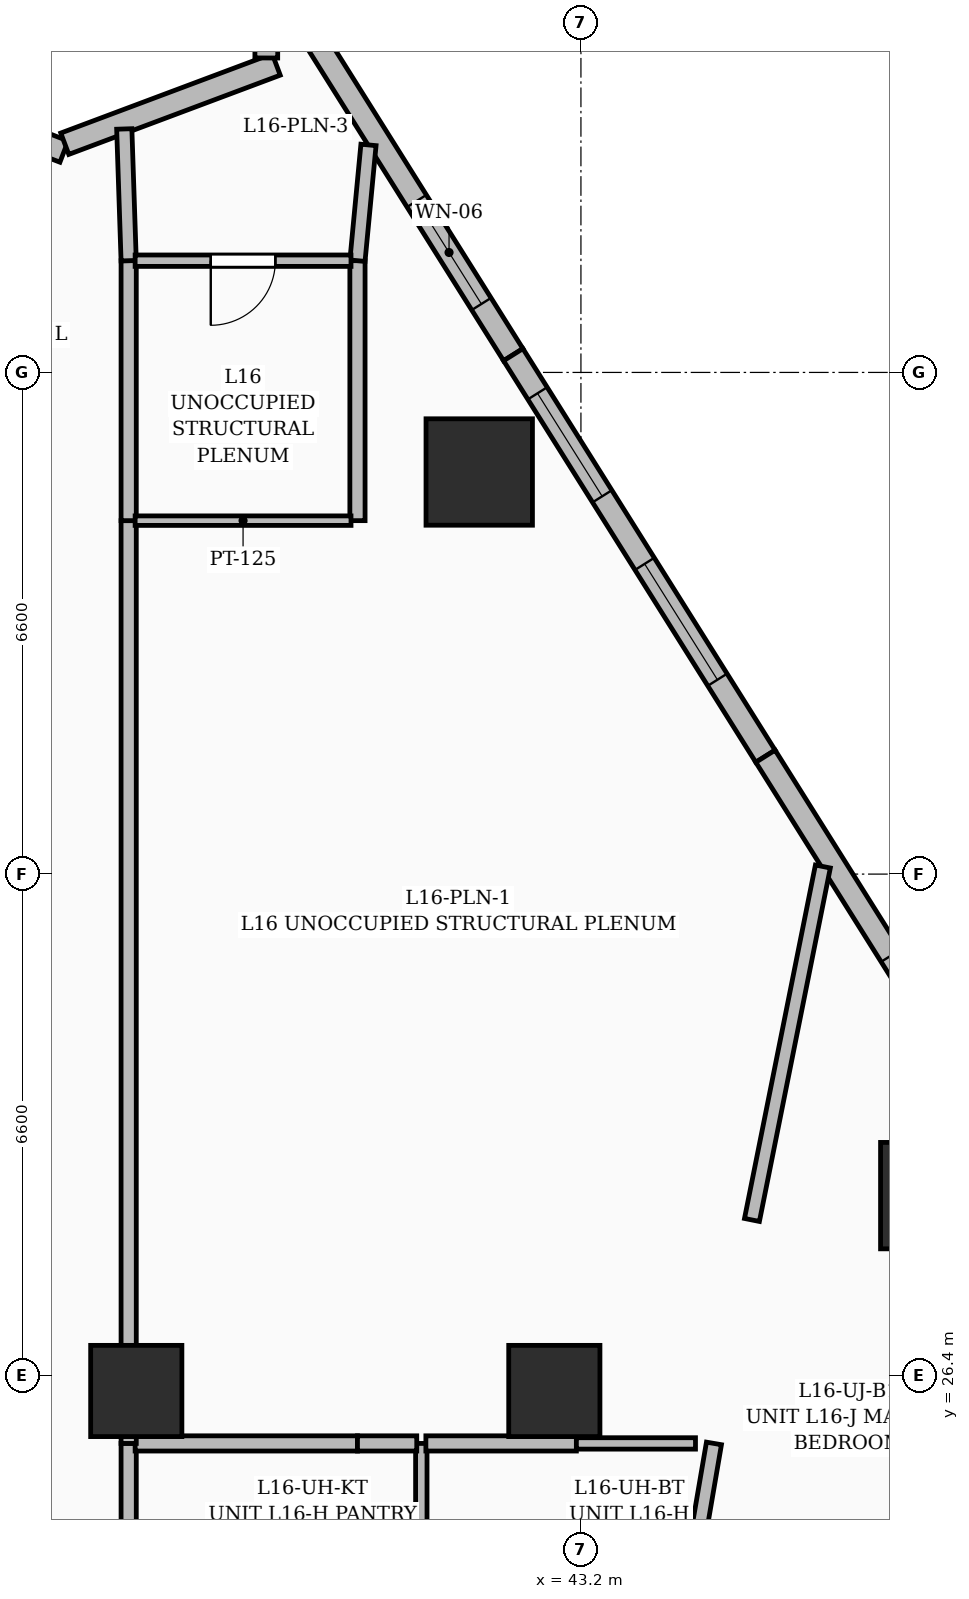
"""IFC4 building model, lengths in metres.
Left out: names, types, materials, properties, quantities, classifications, styles, units other than length and angle.
Written with IfcOpenShell. Run it as: python <this file> out.ifc"""

import sys

from ifc_helpers import new_model, si_unit, direction, frame, frame_2d, origin, origin_2d, place, context, subcontext, project, spatial, rectangle, extrude, element, fill, save


model = new_model("IFC4")
c1 = context("Model", 3, precision=1e-05, world=origin(), true_north=direction((0.0, 1.0)))
c2 = subcontext(c1, "Body", "Model", "MODEL_VIEW")
j1 = project(units=[si_unit("LENGTHUNIT", "METRE"), si_unit("PLANEANGLEUNIT", "RADIAN")], contexts=[c1])
p1 = place(None, origin())
s1 = spatial("IfcSite", under=j1, at=p1, CompositionType="ELEMENT")
p2 = place(p1, origin())
s2 = spatial("IfcBuilding", under=s1, at=p2, CompositionType="ELEMENT")
p3 = place(p2, frame((0.0, 0.0, 67.8)))
s3 = spatial("IfcBuildingStorey", under=s2, at=p3, CompositionType="ELEMENT", Elevation=67.8)
for number, where, z_axis, x_axis in (
    (1, (42.85, 26.2, 0.0), (0.0, 0.0, 1.0), (1.0, 0.0, 0.0)),
    (2, (37.35, 26.2, 0.0), (0.0, 0.0, 1.0), (1.0, 0.0, 0.0)),
):
    element("IfcColumn", number, at=place(p3, frame(where, z_axis=z_axis, x_axis=x_axis)), inside=s3, PredefinedType="COLUMN", context=c2, shape_type="SweptSolid", body=[
        extrude(rectangle(XDim=1.2, YDim=1.2, at=origin_2d()), origin(), (0.0, 0.0, 1.0), 3.6),
    ])
for number, where, z_axis, x_axis in (
    (3, (47.842, 28.77, 0.0), (0.0, 0.0, 1.0), (1.0, 0.0, 0.0)),
    (4, (41.862, 38.29, 0.0), (0.0, 0.0, 1.0), (1.0, 0.0, 0.0)),
):
    element("IfcColumn", number, at=place(p3, frame(where, z_axis=z_axis, x_axis=x_axis)), inside=s3, PredefinedType="COLUMN", context=c2, shape_type="SweptSolid", body=[
        extrude(rectangle(XDim=1.4, YDim=1.4, at=origin_2d()), origin(), (0.0, 0.0, 1.0), 3.6),
    ])
p4 = place(p3, frame((33.614, 43.579, 0.0), z_axis=(0.0, 0.0, 1.0), x_axis=(0.933166321884, -0.359444871576, 0.0)))
e5 = element("IfcWall", 5, at=p4, inside=s3, PredefinedType="SOLIDWALL", context=c2, shape_type="SweptSolid", body=[
    extrude(rectangle(XDim=2.985, YDim=0.3, at=frame_2d((1.493, 0.0))), origin(), (0.0, 0.0, 1.0), 3.35),
])
p5 = place(p4, frame((0.5, 0.0, 0.6)))
e6 = element("IfcOpeningElement", 6, at=p5, cuts=e5, PredefinedType="OPENING", context=c2, shape_type="SweptSolid", body=[
    extrude(rectangle(XDim=1.5, YDim=2.1, at=frame_2d((0.75, 1.05))), frame((0.0, 0.16, 0.0), z_axis=(0.0, -1.0, 0.0), x_axis=(1.0, 0.0, 0.0)), (0.0, 0.0, 1.0), 0.32),
])
p6 = place(p3, frame((36.409, 42.609, 0.0), z_axis=(0.0, 0.0, 1.0), x_axis=(0.936403459864, 0.350925291699, 0.0)))
e7 = element("IfcWall", 7, at=p6, inside=s3, PredefinedType="SOLIDWALL", context=c2, shape_type="SweptSolid", body=[
    extrude(rectangle(XDim=2.971, YDim=0.3, at=frame_2d((1.485, 0.0))), origin(), (0.0, 0.0, 1.0), 3.35),
])
p7 = place(p3, frame((39.061, 43.737, 0.0), z_axis=(0.0, 0.0, 1.0), x_axis=(0.004359916705, 0.999990495518, 0.0)))
e8 = element("IfcWall", 8, at=p7, inside=s3, PredefinedType="SOLIDWALL", context=c2, shape_type="SweptSolid", body=[
    extrude(rectangle(XDim=1.4, YDim=0.3, at=frame_2d((0.7, 0.0))), origin(), (0.0, 0.0, 1.0), 3.35),
])
p8 = place(p3, frame((39.284, 44.65, 0.0), z_axis=(0.0, 0.0, 1.0), x_axis=(0.531922759959, -0.846792877531, 0.0)))
e9 = element("IfcWall", 9, at=p8, inside=s3, PredefinedType="SOLIDWALL", context=c2, shape_type="SweptSolid", body=[
    extrude(rectangle(XDim=5.688, YDim=0.3, at=frame_2d((2.844, 0.0))), origin(), (0.0, 0.0, 1.0), 3.35),
])
p9 = place(p8, frame((3.3, 0.0, 0.55)))
e10 = element("IfcOpeningElement", 10, at=p9, cuts=e9, PredefinedType="OPENING", context=c2, shape_type="SweptSolid", body=[
    extrude(rectangle(XDim=1.6, YDim=2.2, at=frame_2d((0.8, 1.1))), frame((0.0, 0.16, 0.0), z_axis=(0.0, -1.0, 0.0), x_axis=(1.0, 0.0, 0.0)), (0.0, 0.0, 1.0), 0.32),
])
p10 = place(p3, frame((42.31, 39.833, 0.0), z_axis=(0.0, 0.0, 1.0), x_axis=(0.531897384848, -0.846808816671, 0.0)))
e11 = element("IfcWall", 11, at=p10, inside=s3, PredefinedType="SOLIDWALL", context=c2, shape_type="SweptSolid", body=[
    extrude(rectangle(XDim=6.238, YDim=0.3, at=frame_2d((3.119, 0.0))), origin(), (0.0, 0.0, 1.0), 3.35),
])
p11 = place(p10, frame((0.6, 0.0, 0.55)))
e12 = element("IfcOpeningElement", 12, at=p11, cuts=e11, PredefinedType="OPENING", context=c2, shape_type="SweptSolid", body=[
    extrude(rectangle(XDim=1.6, YDim=2.2, at=frame_2d((0.8, 1.1))), frame((0.0, 0.16, 0.0), z_axis=(0.0, -1.0, 0.0), x_axis=(1.0, 0.0, 0.0)), (0.0, 0.0, 1.0), 0.32),
])
p12 = place(p10, frame((3.25, 0.0, 0.6)))
e13 = element("IfcOpeningElement", 13, at=p12, cuts=e11, PredefinedType="OPENING", context=c2, shape_type="SweptSolid", body=[
    extrude(rectangle(XDim=1.8, YDim=2.1, at=frame_2d((0.9, 1.05))), frame((0.0, 0.16, 0.0), z_axis=(0.0, -1.0, 0.0), x_axis=(1.0, 0.0, 0.0)), (0.0, 0.0, 1.0), 0.32),
])
p13 = place(p3, frame((45.627, 34.551, 0.0), z_axis=(0.0, 0.0, 1.0), x_axis=(0.531925449882, -0.846791187819, 0.0)))
e14 = element("IfcWall", 14, at=p13, inside=s3, PredefinedType="SOLIDWALL", context=c2, shape_type="SweptSolid", body=[
    extrude(rectangle(XDim=6.238, YDim=0.3, at=frame_2d((3.119, 0.0))), origin(), (0.0, 0.0, 1.0), 3.35),
])
p14 = place(p13, frame((3.1, 0.0, 0.55)))
e15 = element("IfcOpeningElement", 15, at=p14, cuts=e14, PredefinedType="OPENING", context=c2, shape_type="SweptSolid", body=[
    extrude(rectangle(XDim=1.6, YDim=2.2, at=frame_2d((0.8, 1.1))), frame((0.0, 0.16, 0.0), z_axis=(0.0, -1.0, 0.0), x_axis=(1.0, 0.0, 0.0)), (0.0, 0.0, 1.0), 0.32),
])
p15 = place(p3, frame((41.1, 22.768, 0.0), z_axis=(0.0, 0.0, 1.0), x_axis=(0.0, 1.0, 0.0)))
e16 = element("IfcWall", 16, at=p15, inside=s3, PredefinedType="PARTITIONING", context=c2, shape_type="SweptSolid", body=[
    extrude(rectangle(XDim=2.742, YDim=0.15, at=frame_2d((1.371, 0.0))), origin(), (0.0, 0.0, 1.0), 3.35),
])
p16 = place(p3, frame((37.25, 25.51, 0.0), z_axis=(0.0, 0.0, 1.0), x_axis=(0.0, -1.0, 0.0)))
e17 = element("IfcWall", 17, at=p16, inside=s3, PredefinedType="PARTITIONING", context=c2, shape_type="SweptSolid", body=[
    extrude(rectangle(XDim=2.742, YDim=0.2, at=frame_2d((1.371, 0.0))), origin(), (0.0, 0.0, 1.0), 2.309),
])
p17 = place(p3, frame((40.26, 25.51, 0.0), z_axis=(0.0, 0.0, 1.0), x_axis=(-1.0, 0.0, 0.0)))
e18 = element("IfcWall", 18, at=p17, inside=s3, PredefinedType="PARTITIONING", context=c2, shape_type="SweptSolid", body=[
    extrude(rectangle(XDim=2.925, YDim=0.2, at=frame_2d((1.462, 0.0))), origin(), (0.0, 0.0, 1.0), 3.35),
])
p18 = place(p3, frame((44.52, 23.0, 0.0), z_axis=(0.0, 0.0, 1.0), x_axis=(0.168828104549, 0.985645509864, 0.0)))
e19 = element("IfcWall", 19, at=p18, inside=s3, PredefinedType="PARTITIONING", context=c2, shape_type="SweptSolid", body=[
    extrude(rectangle(XDim=2.547, YDim=0.2, at=frame_2d((1.273, 0.0))), origin(), (0.0, 0.0, 1.0), 3.35),
])
p19 = place(p3, frame((43.14, 25.51, 0.0), z_axis=(0.0, 0.0, 1.0), x_axis=(-1.0, 0.0, 0.0)))
e20 = element("IfcWall", 20, at=p19, inside=s3, PredefinedType="PARTITIONING", context=c2, shape_type="SweptSolid", body=[
    extrude(rectangle(XDim=1.98, YDim=0.2, at=frame_2d((0.99, 0.0))), origin(), (0.0, 0.0, 1.0), 2.309),
])
p20 = place(p3, frame((46.383, 33.1, 0.0), z_axis=(0.0, 0.0, 1.0), x_axis=(-0.196739742163, -0.980455748034, 0.0)))
e21 = element("IfcWall", 21, at=p20, inside=s3, PredefinedType="PARTITIONING", context=c2, shape_type="SweptSolid", body=[
    extrude(rectangle(XDim=4.743, YDim=0.2, at=frame_2d((2.372, 0.0))), origin(), (0.0, 0.0, 1.0), 2.37),
])
p21 = place(p3, frame((37.25, 25.51, 0.0), z_axis=(0.0, 0.0, 1.0), x_axis=(0.0, 1.0, 0.0)))
e22 = element("IfcWall", 22, at=p21, inside=s3, PredefinedType="PARTITIONING", context=c2, shape_type="SweptSolid", body=[
    extrude(rectangle(XDim=12.14, YDim=0.2, at=frame_2d((6.07, 0.0))), origin(), (0.0, 0.0, 1.0), 2.279),
])
p22 = place(p3, frame((37.25, 37.65, 0.0), z_axis=(0.0, 0.0, 1.0), x_axis=(0.0, 1.0, 0.0)))
e23 = element("IfcWall", 23, at=p22, inside=s3, PredefinedType="PARTITIONING", context=c2, shape_type="SweptSolid", body=[
    extrude(rectangle(XDim=3.42, YDim=0.2, at=frame_2d((1.71, 0.0))), origin(), (0.0, 0.0, 1.0), 2.37),
])
p23 = place(p3, frame((37.25, 41.07, 0.0), z_axis=(0.0, 0.0, 1.0), x_axis=(-0.033511738673, 0.999438323946, 0.0)))
e24 = element("IfcWall", 24, at=p23, inside=s3, PredefinedType="PARTITIONING", context=c2, shape_type="SweptSolid", body=[
    extrude(rectangle(XDim=1.734, YDim=0.2, at=frame_2d((0.867, 0.0))), origin(), (0.0, 0.0, 1.0), 3.35),
])
p24 = place(p3, frame((40.26, 41.07, 0.0), z_axis=(0.0, 0.0, 1.0), x_axis=(0.0, -1.0, 0.0)))
e25 = element("IfcWall", 25, at=p24, inside=s3, PredefinedType="PARTITIONING", context=c2, shape_type="SweptSolid", body=[
    extrude(rectangle(XDim=3.42, YDim=0.2, at=frame_2d((1.71, 0.0))), origin(), (0.0, 0.0, 1.0), 2.37),
])
p25 = place(p3, frame((40.405, 42.593, 0.0), z_axis=(0.0, 0.0, 1.0), x_axis=(-0.094794030576, -0.99549690696, 0.0)))
e26 = element("IfcWall", 26, at=p25, inside=s3, PredefinedType="PARTITIONING", context=c2, shape_type="SweptSolid", body=[
    extrude(rectangle(XDim=1.53, YDim=0.2, at=frame_2d((0.765, 0.0))), origin(), (0.0, 0.0, 1.0), 3.35),
])
p26 = place(p3, frame((40.175, 37.65, 0.0), z_axis=(0.0, 0.0, 1.0), x_axis=(-1.0, 0.0, 0.0)))
e27 = element("IfcWall", 27, at=p26, inside=s3, PredefinedType="PARTITIONING", context=c2, shape_type="SweptSolid", body=[
    extrude(rectangle(XDim=2.84, YDim=0.125, at=frame_2d((1.42, 0.0))), origin(), (0.0, 0.0, 1.0), 3.35),
])
p27 = place(p3, frame((40.175, 41.07, 0.0), z_axis=(0.0, 0.0, 1.0), x_axis=(-1.0, 0.0, 0.0)))
e28 = element("IfcWall", 28, at=p27, inside=s3, PredefinedType="PARTITIONING", context=c2, shape_type="SweptSolid", body=[
    extrude(rectangle(XDim=2.84, YDim=0.15, at=frame_2d((1.42, 0.0))), origin(), (0.0, 0.0, 1.0), 3.35),
])
p28 = place(p27, frame((0.995, 0.0, 0.0)))
e29 = element("IfcOpeningElement", 29, at=p28, cuts=e28, PredefinedType="OPENING", context=c2, shape_type="SweptSolid", body=[
    extrude(rectangle(XDim=0.85, YDim=2.1, at=frame_2d((0.425, 1.05))), frame((0.0, 0.085, 0.0), z_axis=(0.0, -1.0, 0.0), x_axis=(1.0, 0.0, 0.0)), (0.0, 0.0, 1.0), 0.17),
])
p29 = place(p3, frame((41.04, 25.51, 0.0), z_axis=(0.0, 0.0, 1.0), x_axis=(-1.0, 0.0, 0.0)))
e30 = element("IfcWall", 30, at=p29, inside=s3, PredefinedType="PARTITIONING", context=c2, shape_type="SweptSolid", body=[
    extrude(rectangle(XDim=0.78, YDim=0.2, at=frame_2d((0.39, 0.0))), origin(), (0.0, 0.0, 1.0), 3.35),
])
p30 = place(p3, frame((44.707, 25.51, 0.0), z_axis=(0.0, 0.0, 1.0), x_axis=(-1.0, 0.0, 0.0)))
e31 = element("IfcWall", 31, at=p30, inside=s3, PredefinedType="PARTITIONING", context=c2, shape_type="SweptSolid", body=[
    extrude(rectangle(XDim=1.567, YDim=0.15, at=frame_2d((0.784, 0.0))), origin(), (0.0, 0.0, 1.0), 2.309),
])
p31 = place(p9, origin())
e32 = element("IfcWindow", 32, at=p31, inside=s3, PartitioningType="SINGLE_PANEL", PredefinedType="WINDOW", context=c2, shape_type="SweptSolid", body=[
    extrude(rectangle(XDim=1.6, YDim=2.2, at=frame_2d((0.8, 1.1))), frame((0.0, 0.03, 0.0), z_axis=(0.0, -1.0, 0.0), x_axis=(1.0, 0.0, 0.0)), (0.0, 0.0, 1.0), 0.06),
])
fill(e10, e32)
p32 = place(p11, origin())
e33 = element("IfcWindow", 33, at=p32, inside=s3, PartitioningType="SINGLE_PANEL", PredefinedType="WINDOW", context=c2, shape_type="SweptSolid", body=[
    extrude(rectangle(XDim=1.6, YDim=2.2, at=frame_2d((0.8, 1.1))), frame((0.0, 0.03, 0.0), z_axis=(0.0, -1.0, 0.0), x_axis=(1.0, 0.0, 0.0)), (0.0, 0.0, 1.0), 0.06),
])
fill(e12, e33)
p33 = place(p12, origin())
e34 = element("IfcWindow", 34, at=p33, inside=s3, PartitioningType="SINGLE_PANEL", PredefinedType="WINDOW", context=c2, shape_type="SweptSolid", body=[
    extrude(rectangle(XDim=1.8, YDim=2.1, at=frame_2d((0.9, 1.05))), frame((0.0, 0.03, 0.0), z_axis=(0.0, -1.0, 0.0), x_axis=(1.0, 0.0, 0.0)), (0.0, 0.0, 1.0), 0.06),
])
fill(e13, e34)
p34 = place(p14, origin())
e35 = element("IfcWindow", 35, at=p34, inside=s3, PartitioningType="SINGLE_PANEL", PredefinedType="WINDOW", context=c2, shape_type="SweptSolid", body=[
    extrude(rectangle(XDim=1.6, YDim=2.2, at=frame_2d((0.8, 1.1))), frame((0.0, 0.03, 0.0), z_axis=(0.0, -1.0, 0.0), x_axis=(1.0, 0.0, 0.0)), (0.0, 0.0, 1.0), 0.06),
])
fill(e15, e35)
p35 = place(p28, origin())
e36 = element("IfcDoor", 36, at=p35, inside=s3, OperationType="SINGLE_SWING_RIGHT", PredefinedType="DOOR", context=c2, shape_type="SweptSolid", body=[
    extrude(rectangle(XDim=0.85, YDim=2.1, at=frame_2d((0.425, 1.05))), frame((0.0, 0.025, 0.0), z_axis=(0.0, -1.0, 0.0), x_axis=(1.0, 0.0, 0.0)), (0.0, 0.0, 1.0), 0.05),
])
fill(e29, e36)
save(model, sys.argv[1])
